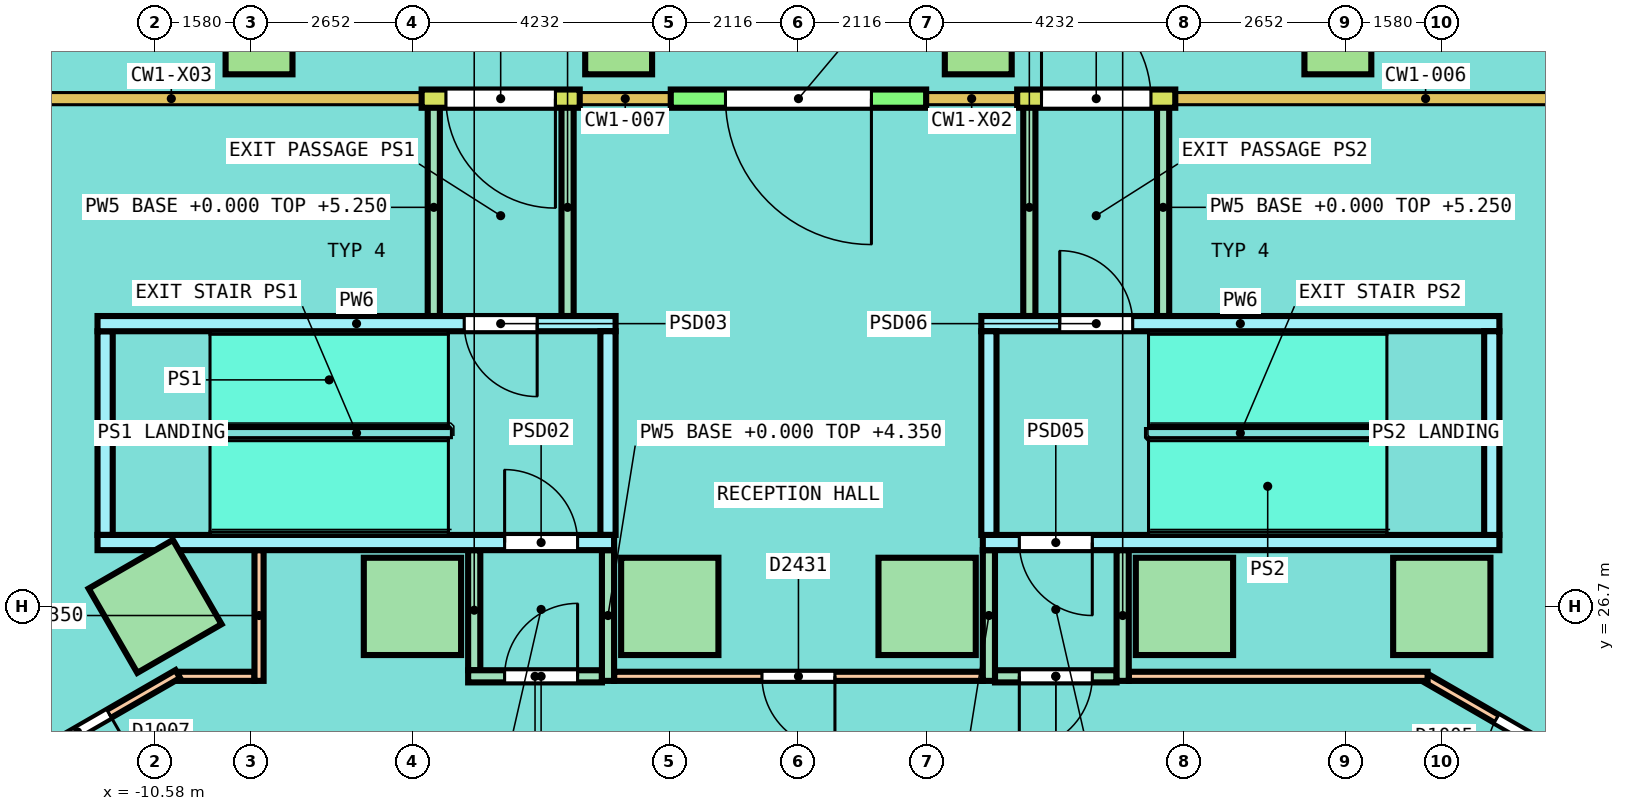
"""IFC4 building model, lengths in metres.
Left out: names, types, materials, properties, quantities, classifications, styles, units other than length and angle.
Written with IfcOpenShell. Run it as: python <this file> out.ifc"""

import sys

from ifc_helpers import new_model, si_unit, direction, frame, frame_2d, origin, origin_2d, place, context, subcontext, project, spatial, rectangle, extrude, element, fill, save


model = new_model("IFC4")
c1 = context("Model", 3, precision=1e-05, world=origin(), true_north=direction((0.0, 1.0)))
c2 = subcontext(c1, "Body", "Model", "MODEL_VIEW")
j1 = project(units=[si_unit("LENGTHUNIT", "METRE"), si_unit("PLANEANGLEUNIT", "RADIAN")], contexts=[c1])
p1 = place(None, origin())
s1 = spatial("IfcSite", under=j1, at=p1, CompositionType="ELEMENT")
p2 = place(p1, origin())
s2 = spatial("IfcBuilding", under=s1, at=p2, CompositionType="ELEMENT")
p3 = place(p2, origin())
s3 = spatial("IfcBuildingStorey", under=s2, at=p3, CompositionType="ELEMENT", Elevation=0.0)
for number, where, z_axis, x_axis in (
    (1, (10.58, 26.7, 0.0), (0.0, 0.0, 1.0), (-1.0, 0.0, 0.0)),
    (2, (6.348, 26.7, 0.0), (0.0, 0.0, 1.0), (-1.0, 0.0, 0.0)),
    (3, (2.116, 26.7, 0.0), (0.0, 0.0, 1.0), (-1.0, 0.0, 0.0)),
    (4, (-2.116, 26.7, 0.0), (0.0, 0.0, 1.0), (-1.0, 0.0, 0.0)),
    (5, (-6.348, 26.7, 0.0), (0.0, 0.0, 1.0), (-1.0, 0.0, 0.0)),
    (6, (-10.58, 26.7, 0.0), (0.0, 0.0, 1.0), (-0.866, -0.5, 0.0)),
):
    element("IfcColumn", number, at=place(p3, frame(where, z_axis=z_axis, x_axis=x_axis)), inside=s3, PredefinedType="COLUMN", context=c2, shape_type="SweptSolid", body=[
        extrude(rectangle(XDim=1.6, YDim=1.6, at=origin_2d()), origin(), (0.0, 0.0, 1.0), 5.25),
    ])
for number, where, z_axis, x_axis in (
    (7, (8.871, 36.0, -0.35), (0.0, 0.0, 1.0), (-1.0, 0.0, 0.0)),
    (8, (2.957, 36.0, -0.35), (0.0, 0.0, 1.0), (-1.0, 0.0, 0.0)),
    (9, (-2.957, 36.0, -0.35), (0.0, 0.0, 1.0), (-1.0, 0.0, 0.0)),
    (10, (-8.871, 36.0, -0.35), (0.0, 0.0, 1.0), (-1.0, 0.0, 0.0)),
):
    element("IfcColumn", number, at=place(p3, frame(where, z_axis=z_axis, x_axis=x_axis)), inside=s3, PredefinedType="COLUMN", context=c2, shape_type="SweptSolid", body=[
        extrude(rectangle(XDim=1.1, YDim=1.1, at=origin_2d()), origin(), (0.0, 0.0, 1.0), 5.6),
    ])
p4 = place(p3, frame((2.1, 35.05, 0.0), z_axis=(0.0, 0.0, 1.0), x_axis=(-1.0, 0.0, 0.0)))
e11 = element("IfcWall", 11, at=p4, inside=s3, PredefinedType="SOLIDWALL", context=c2, shape_type="SweptSolid", body=[
    extrude(rectangle(XDim=4.2, YDim=0.3, at=frame_2d((2.1, 0.0))), origin(), (0.0, 0.0, 1.0), 5.25),
])
p5 = place(p4, frame((0.9, 0.0, 0.0)))
e12 = element("IfcOpeningElement", 12, at=p5, cuts=e11, PredefinedType="OPENING", context=c2, shape_type="SweptSolid", body=[
    extrude(rectangle(XDim=2.4, YDim=3.0, at=frame_2d((1.2, 1.5))), frame((0.0, 0.16, 0.0), z_axis=(0.0, -1.0, 0.0), x_axis=(1.0, 0.0, 0.0)), (0.0, 0.0, 1.0), 0.32),
])
p6 = place(p3, frame((6.197, 35.05, 0.0), z_axis=(0.0, 0.0, 1.0), x_axis=(-1.0, 0.0, 0.0)))
e13 = element("IfcWall", 13, at=p6, inside=s3, PredefinedType="SOLIDWALL", context=c2, shape_type="SweptSolid", body=[
    extrude(rectangle(XDim=2.6, YDim=0.3, at=frame_2d((1.3, 0.0))), origin(), (0.0, 0.0, 1.0), 5.25),
])
p7 = place(p6, frame((2.2, 0.0, 0.0), z_axis=(0.0, 0.0, 1.0), x_axis=(-1.0, 0.0, 0.0)))
e14 = element("IfcOpeningElement", 14, at=p7, cuts=e13, PredefinedType="OPENING", context=c2, shape_type="SweptSolid", body=[
    extrude(rectangle(XDim=1.8, YDim=2.4, at=frame_2d((0.9, 1.2))), frame((0.0, 0.16, 0.0), z_axis=(0.0, -1.0, 0.0), x_axis=(1.0, 0.0, 0.0)), (0.0, 0.0, 1.0), 0.32),
])
p8 = place(p3, frame((-3.597, 35.05, 0.0), z_axis=(0.0, 0.0, 1.0), x_axis=(-1.0, 0.0, 0.0)))
e15 = element("IfcWall", 15, at=p8, inside=s3, PredefinedType="SOLIDWALL", context=c2, shape_type="SweptSolid", body=[
    extrude(rectangle(XDim=2.6, YDim=0.3, at=frame_2d((1.3, 0.0))), origin(), (0.0, 0.0, 1.0), 5.25),
])
p9 = place(p8, frame((2.2, 0.0, 0.0), z_axis=(0.0, 0.0, 1.0), x_axis=(-1.0, 0.0, 0.0)))
e16 = element("IfcOpeningElement", 16, at=p9, cuts=e15, PredefinedType="OPENING", context=c2, shape_type="SweptSolid", body=[
    extrude(rectangle(XDim=1.8, YDim=2.4, at=frame_2d((0.9, 1.2))), frame((0.0, 0.16, 0.0), z_axis=(0.0, -1.0, 0.0), x_axis=(1.0, 0.0, 0.0)), (0.0, 0.0, 1.0), 0.32),
])
p10 = place(p3, frame((10.337, 25.512, 0.0), z_axis=(0.0, 0.0, 1.0), x_axis=(0.866023143435, -0.50000391502, 0.0)))
e17 = element("IfcWall", 17, at=p10, inside=s3, PredefinedType="PARTITIONING", context=c2, shape_type="SweptSolid", body=[
    extrude(rectangle(XDim=7.759, YDim=0.15, at=frame_2d((3.879, 0.0))), origin(), (0.0, 0.0, 1.0), 4.2),
])
p11 = place(p10, frame((1.319, 0.0, 0.0)))
e18 = element("IfcOpeningElement", 18, at=p11, cuts=e17, PredefinedType="OPENING", context=c2, shape_type="SweptSolid", body=[
    extrude(rectangle(XDim=1.2, YDim=2.1, at=frame_2d((0.6, 1.05))), frame((0.0, 0.085, 0.0), z_axis=(0.0, -1.0, 0.0), x_axis=(1.0, 0.0, 0.0)), (0.0, 0.0, 1.0), 0.17),
])
p12 = place(p3, frame((-10.197, 25.55, 0.0), z_axis=(0.0, 0.0, 1.0), x_axis=(1.0, 0.0, 0.0)))
e19 = element("IfcWall", 19, at=p12, inside=s3, PredefinedType="PARTITIONING", context=c2, shape_type="SweptSolid", body=[
    extrude(rectangle(XDim=1.251, YDim=0.15, at=frame_2d((0.625, 0.0))), origin(), (0.0, 0.0, 1.0), 4.2),
])
p13 = place(p3, frame((-3.032, 25.55, 0.0), z_axis=(0.0, 0.0, 1.0), x_axis=(1.0, 0.0, 0.0)))
e20 = element("IfcWall", 20, at=p13, inside=s3, PredefinedType="PARTITIONING", context=c2, shape_type="SweptSolid", body=[
    extrude(rectangle(XDim=6.064, YDim=0.15, at=frame_2d((3.032, 0.0))), origin(), (0.0, 0.0, 1.0), 4.2),
])
p14 = place(p13, frame((2.432, 0.0, 0.0)))
e21 = element("IfcOpeningElement", 21, at=p14, cuts=e20, PredefinedType="OPENING", context=c2, shape_type="SweptSolid", body=[
    extrude(rectangle(XDim=1.2, YDim=2.1, at=frame_2d((0.6, 1.05))), frame((0.0, 0.085, 0.0), z_axis=(0.0, -1.0, 0.0), x_axis=(1.0, 0.0, 0.0)), (0.0, 0.0, 1.0), 0.17),
])
p15 = place(p3, frame((5.432, 25.55, 0.0), z_axis=(0.0, 0.0, 1.0), x_axis=(1.0, 0.0, 0.0)))
e22 = element("IfcWall", 22, at=p15, inside=s3, PredefinedType="PARTITIONING", context=c2, shape_type="SweptSolid", body=[
    extrude(rectangle(XDim=4.915, YDim=0.15, at=frame_2d((2.458, 0.0))), origin(), (0.0, 0.0, 1.0), 4.2),
])
p16 = place(p3, frame((-17.056, 21.633, 0.0), z_axis=(0.0, 0.0, 1.0), x_axis=(0.866025195951, 0.500000359978, 0.0)))
e23 = element("IfcWall", 23, at=p16, inside=s3, PredefinedType="PARTITIONING", context=c2, shape_type="SweptSolid", body=[
    extrude(rectangle(XDim=7.909, YDim=0.15, at=frame_2d((3.954, 0.0))), origin(), (0.0, 0.0, 1.0), 4.2),
])
p17 = place(p16, frame((5.405, 0.0, 0.0)))
e24 = element("IfcOpeningElement", 24, at=p17, cuts=e23, PredefinedType="OPENING", context=c2, shape_type="SweptSolid", body=[
    extrude(rectangle(XDim=1.2, YDim=2.1, at=frame_2d((0.6, 1.05))), frame((0.0, 0.085, 0.0), z_axis=(0.0, -1.0, 0.0), x_axis=(1.0, 0.0, 0.0)), (0.0, 0.0, 1.0), 0.17),
])
p18 = place(p3, frame((-8.871, 25.475, 0.0), z_axis=(0.0, 0.0, 1.0), x_axis=(0.0, 1.0, 0.0)))
e25 = element("IfcWall", 25, at=p18, inside=s3, PredefinedType="PARTITIONING", context=c2, shape_type="SweptSolid", body=[
    extrude(rectangle(XDim=2.15, YDim=0.15, at=frame_2d((1.075, 0.0))), origin(), (0.0, 0.0, 1.0), 4.35),
])
p19 = place(p3, frame((-5.332, 25.65, 0.0), z_axis=(0.0, 0.0, 1.0), x_axis=(0.0, 1.0, 0.0)))
e26 = element("IfcWall", 26, at=p19, inside=s3, PredefinedType="PARTITIONING", context=c2, shape_type="SweptSolid", body=[
    extrude(rectangle(XDim=1.975, YDim=0.2, at=frame_2d((0.988, 0.0))), origin(), (0.0, 0.0, 1.0), 4.35),
])
p20 = place(p3, frame((-5.432, 25.55, 0.0), z_axis=(0.0, 0.0, 1.0), x_axis=(1.0, 0.0, 0.0)))
e27 = element("IfcWall", 27, at=p20, inside=s3, PredefinedType="PARTITIONING", context=c2, shape_type="SweptSolid", body=[
    extrude(rectangle(XDim=2.2, YDim=0.2, at=frame_2d((1.1, 0.0))), origin(), (0.0, 0.0, 1.0), 5.25),
])
p21 = place(p20, frame((0.6, 0.0, 0.0)))
e28 = element("IfcOpeningElement", 28, at=p21, cuts=e27, PredefinedType="OPENING", context=c2, shape_type="SweptSolid", body=[
    extrude(rectangle(XDim=1.2, YDim=2.1, at=frame_2d((0.6, 1.05))), frame((0.0, 0.11, 0.0), z_axis=(0.0, -1.0, 0.0), x_axis=(1.0, 0.0, 0.0)), (0.0, 0.0, 1.0), 0.22),
])
p22 = place(p3, frame((3.232, 25.55, 0.0), z_axis=(0.0, 0.0, 1.0), x_axis=(1.0, 0.0, 0.0)))
e29 = element("IfcWall", 29, at=p22, inside=s3, PredefinedType="PARTITIONING", context=c2, shape_type="SweptSolid", body=[
    extrude(rectangle(XDim=2.0, YDim=0.2, at=frame_2d((1.0, 0.0))), origin(), (0.0, 0.0, 1.0), 5.25),
])
p23 = place(p22, frame((0.4, 0.0, 0.0)))
e30 = element("IfcOpeningElement", 30, at=p23, cuts=e29, PredefinedType="OPENING", context=c2, shape_type="SweptSolid", body=[
    extrude(rectangle(XDim=1.2, YDim=2.1, at=frame_2d((0.6, 1.05))), frame((0.0, 0.11, 0.0), z_axis=(0.0, -1.0, 0.0), x_axis=(1.0, 0.0, 0.0)), (0.0, 0.0, 1.0), 0.22),
])
p24 = place(p3, frame((5.332, 25.475, 0.0), z_axis=(0.0, 0.0, 1.0), x_axis=(0.0, 1.0, 0.0)))
e31 = element("IfcWall", 31, at=p24, inside=s3, PredefinedType="PARTITIONING", context=c2, shape_type="SweptSolid", body=[
    extrude(rectangle(XDim=2.15, YDim=0.2, at=frame_2d((1.075, 0.0))), origin(), (0.0, 0.0, 1.0), 4.35),
])
for number, where, z_axis, x_axis in (
    (32, (5.997, 31.475, 0.0), (0.0, 0.0, 1.0), (0.0, 1.0, 0.0)),
    (33, (-5.997, 31.475, 0.0), (0.0, 0.0, 1.0), (0.0, 1.0, 0.0)),
):
    element("IfcWall", number, at=place(p3, frame(where, z_axis=z_axis, x_axis=x_axis)), inside=s3, PredefinedType="PARTITIONING", context=c2, shape_type="SweptSolid", body=[
        extrude(rectangle(XDim=3.575, YDim=0.2, at=frame_2d((1.788, 0.0))), origin(), (0.0, 0.0, 1.0), 5.25),
    ])
p25 = place(p3, frame((-3.132, 25.475, 0.0), z_axis=(0.0, 0.0, 1.0), x_axis=(0.0, 1.0, 0.0)))
e34 = element("IfcWall", 34, at=p25, inside=s3, PredefinedType="PARTITIONING", context=c2, shape_type="SweptSolid", body=[
    extrude(rectangle(XDim=2.15, YDim=0.2, at=frame_2d((1.075, 0.0))), origin(), (0.0, 0.0, 1.0), 4.35),
])
p26 = place(p3, frame((-3.797, 31.475, 0.0), z_axis=(0.0, 0.0, 1.0), x_axis=(0.0, 1.0, 0.0)))
e35 = element("IfcWall", 35, at=p26, inside=s3, PredefinedType="PARTITIONING", context=c2, shape_type="SweptSolid", body=[
    extrude(rectangle(XDim=3.575, YDim=0.2, at=frame_2d((1.788, 0.0))), origin(), (0.0, 0.0, 1.0), 5.25),
])
p27 = place(p3, frame((3.132, 25.475, 0.0), z_axis=(0.0, 0.0, 1.0), x_axis=(0.0, 1.0, 0.0)))
e36 = element("IfcWall", 36, at=p27, inside=s3, PredefinedType="PARTITIONING", context=c2, shape_type="SweptSolid", body=[
    extrude(rectangle(XDim=2.15, YDim=0.2, at=frame_2d((1.075, 0.0))), origin(), (0.0, 0.0, 1.0), 4.35),
])
p28 = place(p3, frame((3.797, 31.475, 0.0), z_axis=(0.0, 0.0, 1.0), x_axis=(0.0, 1.0, 0.0)))
e37 = element("IfcWall", 37, at=p28, inside=s3, PredefinedType="PARTITIONING", context=c2, shape_type="SweptSolid", body=[
    extrude(rectangle(XDim=3.575, YDim=0.2, at=frame_2d((1.788, 0.0))), origin(), (0.0, 0.0, 1.0), 5.25),
])
p29 = place(p3, frame((-11.402, 27.875, 0.0), z_axis=(0.0, 0.0, 1.0), x_axis=(0.0, 1.0, 0.0)))
e38 = element("IfcWall", 38, at=p29, inside=s3, PredefinedType="SOLIDWALL", context=c2, shape_type="SweptSolid", body=[
    extrude(rectangle(XDim=3.35, YDim=0.25, at=frame_2d((1.675, 0.0))), origin(), (0.0, 0.0, 1.0), 5.25),
])
p30 = place(p3, frame((-11.527, 31.35, 0.0), z_axis=(0.0, 0.0, 1.0), x_axis=(1.0, 0.0, 0.0)))
e39 = element("IfcWall", 39, at=p30, inside=s3, PredefinedType="SOLIDWALL", context=c2, shape_type="SweptSolid", body=[
    extrude(rectangle(XDim=8.52, YDim=0.25, at=frame_2d((4.26, 0.0))), origin(), (0.0, 0.0, 1.0), 5.25),
])
p31 = place(p30, frame((6.03, 0.0, 0.0)))
e40 = element("IfcOpeningElement", 40, at=p31, cuts=e39, PredefinedType="OPENING", context=c2, shape_type="SweptSolid", body=[
    extrude(rectangle(XDim=1.2, YDim=2.1, at=frame_2d((0.6, 1.05))), frame((0.0, 0.135, 0.0), z_axis=(0.0, -1.0, 0.0), x_axis=(1.0, 0.0, 0.0)), (0.0, 0.0, 1.0), 0.27),
])
p32 = place(p3, frame((3.007, 31.35, 0.0), z_axis=(0.0, 0.0, 1.0), x_axis=(1.0, 0.0, 0.0)))
e41 = element("IfcWall", 41, at=p32, inside=s3, PredefinedType="SOLIDWALL", context=c2, shape_type="SweptSolid", body=[
    extrude(rectangle(XDim=8.52, YDim=0.25, at=frame_2d((4.26, 0.0))), origin(), (0.0, 0.0, 1.0), 5.25),
])
p33 = place(p32, frame((1.29, 0.0, 0.0)))
e42 = element("IfcOpeningElement", 42, at=p33, cuts=e41, PredefinedType="OPENING", context=c2, shape_type="SweptSolid", body=[
    extrude(rectangle(XDim=1.2, YDim=2.1, at=frame_2d((0.6, 1.05))), frame((0.0, 0.135, 0.0), z_axis=(0.0, -1.0, 0.0), x_axis=(1.0, 0.0, 0.0)), (0.0, 0.0, 1.0), 0.27),
])
p34 = place(p3, frame((-3.132, 27.875, 0.0), z_axis=(0.0, 0.0, 1.0), x_axis=(0.0, 1.0, 0.0)))
e43 = element("IfcWall", 43, at=p34, inside=s3, PredefinedType="SOLIDWALL", context=c2, shape_type="SweptSolid", body=[
    extrude(rectangle(XDim=3.35, YDim=0.25, at=frame_2d((1.675, 0.0))), origin(), (0.0, 0.0, 1.0), 5.25),
])
p35 = place(p3, frame((-11.527, 27.75, 0.0), z_axis=(0.0, 0.0, 1.0), x_axis=(1.0, 0.0, 0.0)))
e44 = element("IfcWall", 44, at=p35, inside=s3, PredefinedType="SOLIDWALL", context=c2, shape_type="SweptSolid", body=[
    extrude(rectangle(XDim=8.495, YDim=0.25, at=frame_2d((4.248, 0.0))), origin(), (0.0, 0.0, 1.0), 5.25),
])
p36 = place(p35, frame((6.695, 0.0, 0.0)))
e45 = element("IfcOpeningElement", 45, at=p36, cuts=e44, PredefinedType="OPENING", context=c2, shape_type="SweptSolid", body=[
    extrude(rectangle(XDim=1.2, YDim=2.1, at=frame_2d((0.6, 1.05))), frame((0.0, 0.135, 0.0), z_axis=(0.0, -1.0, 0.0), x_axis=(1.0, 0.0, 0.0)), (0.0, 0.0, 1.0), 0.27),
])
p37 = place(p3, frame((3.032, 27.75, 0.0), z_axis=(0.0, 0.0, 1.0), x_axis=(1.0, 0.0, 0.0)))
e46 = element("IfcWall", 46, at=p37, inside=s3, PredefinedType="SOLIDWALL", context=c2, shape_type="SweptSolid", body=[
    extrude(rectangle(XDim=8.495, YDim=0.25, at=frame_2d((4.248, 0.0))), origin(), (0.0, 0.0, 1.0), 5.25),
])
p38 = place(p37, frame((0.6, 0.0, 0.0)))
e47 = element("IfcOpeningElement", 47, at=p38, cuts=e46, PredefinedType="OPENING", context=c2, shape_type="SweptSolid", body=[
    extrude(rectangle(XDim=1.2, YDim=2.1, at=frame_2d((0.6, 1.05))), frame((0.0, 0.135, 0.0), z_axis=(0.0, -1.0, 0.0), x_axis=(1.0, 0.0, 0.0)), (0.0, 0.0, 1.0), 0.27),
])
for number, where, z_axis, x_axis in (
    (48, (3.132, 27.875, 0.0), (0.0, 0.0, 1.0), (0.0, 1.0, 0.0)),
    (49, (11.402, 27.875, 0.0), (0.0, 0.0, 1.0), (0.0, 1.0, 0.0)),
):
    element("IfcWall", number, at=place(p3, frame(where, z_axis=z_axis, x_axis=x_axis)), inside=s3, PredefinedType="SOLIDWALL", context=c2, shape_type="SweptSolid", body=[
        extrude(rectangle(XDim=3.35, YDim=0.25, at=frame_2d((1.675, 0.0))), origin(), (0.0, 0.0, 1.0), 5.25),
    ])
p39 = place(p5, origin())
e50 = element("IfcDoor", 50, at=p39, inside=s3, OperationType="DOUBLE_DOOR_SINGLE_SWING", PredefinedType="DOOR", context=c2, shape_type="SweptSolid", body=[
    extrude(rectangle(XDim=2.4, YDim=3.0, at=frame_2d((1.2, 1.5))), frame((0.0, 0.025, 0.0), z_axis=(0.0, -1.0, 0.0), x_axis=(1.0, 0.0, 0.0)), (0.0, 0.0, 1.0), 0.05),
])
fill(e12, e50)
p40 = place(p7, origin())
e51 = element("IfcDoor", 51, at=p40, inside=s3, OperationType="DOUBLE_DOOR_SINGLE_SWING", PredefinedType="DOOR", context=c2, shape_type="SweptSolid", body=[
    extrude(rectangle(XDim=1.8, YDim=2.4, at=frame_2d((0.9, 1.2))), frame((0.0, 0.025, 0.0), z_axis=(0.0, -1.0, 0.0), x_axis=(1.0, 0.0, 0.0)), (0.0, 0.0, 1.0), 0.05),
])
fill(e14, e51)
p41 = place(p9, origin())
e52 = element("IfcDoor", 52, at=p41, inside=s3, OperationType="DOUBLE_DOOR_SINGLE_SWING", PredefinedType="DOOR", context=c2, shape_type="SweptSolid", body=[
    extrude(rectangle(XDim=1.8, YDim=2.4, at=frame_2d((0.9, 1.2))), frame((0.0, 0.025, 0.0), z_axis=(0.0, -1.0, 0.0), x_axis=(1.0, 0.0, 0.0)), (0.0, 0.0, 1.0), 0.05),
])
fill(e16, e52)
p42 = place(p11, origin())
e53 = element("IfcDoor", 53, at=p42, inside=s3, OperationType="DOUBLE_DOOR_SINGLE_SWING", PredefinedType="DOOR", context=c2, shape_type="SweptSolid", body=[
    extrude(rectangle(XDim=1.2, YDim=2.1, at=frame_2d((0.6, 1.05))), frame((0.0, 0.025, 0.0), z_axis=(0.0, -1.0, 0.0), x_axis=(1.0, 0.0, 0.0)), (0.0, 0.0, 1.0), 0.05),
])
fill(e18, e53)
p43 = place(p17, origin())
e54 = element("IfcDoor", 54, at=p43, inside=s3, OperationType="DOUBLE_DOOR_SINGLE_SWING", PredefinedType="DOOR", context=c2, shape_type="SweptSolid", body=[
    extrude(rectangle(XDim=1.2, YDim=2.1, at=frame_2d((0.6, 1.05))), frame((0.0, 0.025, 0.0), z_axis=(0.0, -1.0, 0.0), x_axis=(1.0, 0.0, 0.0)), (0.0, 0.0, 1.0), 0.05),
])
fill(e24, e54)
p44 = place(p21, origin())
e55 = element("IfcDoor", 55, at=p44, inside=s3, OperationType="SINGLE_SWING_RIGHT", PredefinedType="DOOR", context=c2, shape_type="SweptSolid", body=[
    extrude(rectangle(XDim=1.2, YDim=2.1, at=frame_2d((0.6, 1.05))), frame((0.0, 0.025, 0.0), z_axis=(0.0, -1.0, 0.0), x_axis=(1.0, 0.0, 0.0)), (0.0, 0.0, 1.0), 0.05),
])
fill(e28, e55)
p45 = place(p36, origin())
e56 = element("IfcDoor", 56, at=p45, inside=s3, OperationType="SINGLE_SWING_LEFT", PredefinedType="DOOR", context=c2, shape_type="SweptSolid", body=[
    extrude(rectangle(XDim=1.2, YDim=2.1, at=frame_2d((0.6, 1.05))), frame((0.0, 0.025, 0.0), z_axis=(0.0, -1.0, 0.0), x_axis=(1.0, 0.0, 0.0)), (0.0, 0.0, 1.0), 0.05),
])
fill(e45, e56)
p46 = place(p31, origin())
e57 = element("IfcDoor", 57, at=p46, inside=s3, OperationType="SINGLE_SWING_RIGHT", PredefinedType="DOOR", context=c2, shape_type="SweptSolid", body=[
    extrude(rectangle(XDim=1.2, YDim=2.1, at=frame_2d((0.6, 1.05))), frame((0.0, 0.025, 0.0), z_axis=(0.0, -1.0, 0.0), x_axis=(1.0, 0.0, 0.0)), (0.0, 0.0, 1.0), 0.05),
])
fill(e40, e57)
p47 = place(p23, origin())
e58 = element("IfcDoor", 58, at=p47, inside=s3, OperationType="SINGLE_SWING_LEFT", PredefinedType="DOOR", context=c2, shape_type="SweptSolid", body=[
    extrude(rectangle(XDim=1.2, YDim=2.1, at=frame_2d((0.6, 1.05))), frame((0.0, 0.025, 0.0), z_axis=(0.0, -1.0, 0.0), x_axis=(1.0, 0.0, 0.0)), (0.0, 0.0, 1.0), 0.05),
])
fill(e30, e58)
p48 = place(p38, origin())
e59 = element("IfcDoor", 59, at=p48, inside=s3, OperationType="SINGLE_SWING_RIGHT", PredefinedType="DOOR", context=c2, shape_type="SweptSolid", body=[
    extrude(rectangle(XDim=1.2, YDim=2.1, at=frame_2d((0.6, 1.05))), frame((0.0, 0.025, 0.0), z_axis=(0.0, -1.0, 0.0), x_axis=(1.0, 0.0, 0.0)), (0.0, 0.0, 1.0), 0.05),
])
fill(e47, e59)
p49 = place(p33, origin())
e60 = element("IfcDoor", 60, at=p49, inside=s3, OperationType="SINGLE_SWING_LEFT", PredefinedType="DOOR", context=c2, shape_type="SweptSolid", body=[
    extrude(rectangle(XDim=1.2, YDim=2.1, at=frame_2d((0.6, 1.05))), frame((0.0, 0.025, 0.0), z_axis=(0.0, -1.0, 0.0), x_axis=(1.0, 0.0, 0.0)), (0.0, 0.0, 1.0), 0.05),
])
fill(e42, e60)
p50 = place(p14, origin())
e61 = element("IfcDoor", 61, at=p50, inside=s3, OperationType="DOUBLE_DOOR_SINGLE_SWING", PredefinedType="DOOR", context=c2, shape_type="SweptSolid", body=[
    extrude(rectangle(XDim=1.2, YDim=2.1, at=frame_2d((0.6, 1.05))), frame((0.0, 0.025, 0.0), z_axis=(0.0, -1.0, 0.0), x_axis=(1.0, 0.0, 0.0)), (0.0, 0.0, 1.0), 0.05),
])
fill(e21, e61)
save(model, sys.argv[1])
